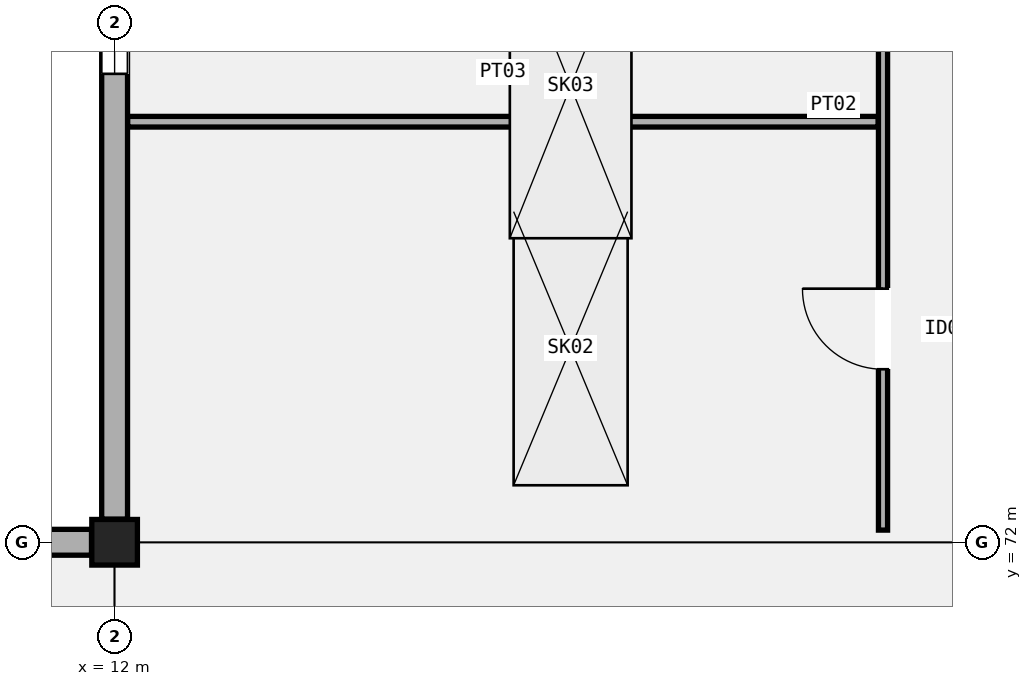
"""IFC4 building model, lengths in metres.
Left out: names, types, materials, properties, quantities, classifications, styles, units other than length and angle.
Written with IfcOpenShell. Run it as: python <this file> out.ifc"""

import sys

from ifc_helpers import new_model, si_unit, direction, frame, frame_2d, origin, origin_2d, place, context, subcontext, project, spatial, rectangle, extrude, element, fill, save


model = new_model("IFC4")
c1 = context("Model", 3, precision=1e-05, world=origin(), true_north=direction((0.0, 1.0)))
c2 = subcontext(c1, "Body", "Model", "MODEL_VIEW")
j1 = project(units=[si_unit("LENGTHUNIT", "METRE"), si_unit("PLANEANGLEUNIT", "RADIAN")], contexts=[c1])
p1 = place(None, origin())
s1 = spatial("IfcSite", under=j1, at=p1, CompositionType="ELEMENT")
p2 = place(p1, origin())
s2 = spatial("IfcBuilding", under=s1, at=p2, CompositionType="ELEMENT")
p3 = place(p2, frame((0.0, 0.0, 25.8)))
s3 = spatial("IfcBuildingStorey", under=s2, at=p3, CompositionType="ELEMENT", Elevation=25.8)
p4 = place(p3, frame((12.0, 72.0, 0.0), z_axis=(0.0, 0.0, 1.0), x_axis=(1.0, 0.0, 0.0)))
e1 = element("IfcColumn", 1, at=p4, inside=s3, PredefinedType="COLUMN", context=c2, shape_type="SweptSolid", body=[
    extrude(rectangle(XDim=0.6, YDim=0.6, at=origin_2d()), origin(), (0.0, 0.0, 1.0), 5.4),
])
p5 = place(p3, frame((0.354, 72.0, 0.0), z_axis=(0.0, 0.0, 1.0), x_axis=(1.0, 0.0, 0.0)))
e2 = element("IfcWall", 2, at=p5, inside=s3, PredefinedType="SOLIDWALL", context=c2, shape_type="SweptSolid", body=[
    extrude(rectangle(XDim=11.342, YDim=0.34, at=frame_2d((5.671, 0.0))), origin(), (0.0, 0.0, 1.0), 4.34),
])
p6 = place(p5, frame((1.5, 0.0, 0.95)))
e3 = element("IfcOpeningElement", 3, at=p6, cuts=e2, PredefinedType="OPENING", context=c2, shape_type="SweptSolid", body=[
    extrude(rectangle(XDim=3.3, YDim=1.8, at=frame_2d((1.65, 0.9))), frame((0.0, 0.18, 0.0), z_axis=(0.0, -1.0, 0.0), x_axis=(1.0, 0.0, 0.0)), (0.0, 0.0, 1.0), 0.36),
])
p7 = place(p3, frame((12.0, 72.304, 0.0), z_axis=(0.0, 0.0, 1.0), x_axis=(0.0, 1.0, 0.0)))
e4 = element("IfcWall", 4, at=p7, inside=s3, PredefinedType="SOLIDWALL", context=c2, shape_type="SweptSolid", body=[
    extrude(rectangle(XDim=11.492, YDim=0.34, at=frame_2d((5.746, 0.0))), origin(), (0.0, 0.0, 1.0), 4.44),
])
p8 = place(p7, frame((5.859, 0.0, 0.95)))
e5 = element("IfcOpeningElement", 5, at=p8, cuts=e4, PredefinedType="OPENING", context=c2, shape_type="SweptSolid", body=[
    extrude(rectangle(XDim=1.8, YDim=2.55, at=frame_2d((0.9, 1.275))), frame((0.0, 0.18, 0.0), z_axis=(0.0, -1.0, 0.0), x_axis=(1.0, 0.0, 0.0)), (0.0, 0.0, 1.0), 0.36),
])
p9 = place(p3, frame((22.11, 72.16, 0.0), z_axis=(0.0, 0.0, 1.0), x_axis=(0.0, 1.0, 0.0)))
e6 = element("IfcWall", 6, at=p9, inside=s3, PredefinedType="PARTITIONING", context=c2, shape_type="SweptSolid", body=[
    extrude(rectangle(XDim=11.68, YDim=0.12, at=frame_2d((5.84, 0.0))), origin(), (0.0, 0.0, 1.0), 4.35),
])
p10 = place(p9, frame((2.116, 0.0, 0.0)))
e7 = element("IfcOpeningElement", 7, at=p10, cuts=e6, PredefinedType="OPENING", context=c2, shape_type="SweptSolid", body=[
    extrude(rectangle(XDim=1.06, YDim=2.15, at=frame_2d((0.53, 1.075))), frame((0.0, 0.07, 0.0), z_axis=(0.0, -1.0, 0.0), x_axis=(1.0, 0.0, 0.0)), (0.0, 0.0, 1.0), 0.14),
])
p11 = place(p9, frame((8.021, 0.0, 0.0)))
e8 = element("IfcOpeningElement", 8, at=p11, cuts=e6, PredefinedType="OPENING", context=c2, shape_type="SweptSolid", body=[
    extrude(rectangle(XDim=1.09, YDim=2.16, at=frame_2d((0.545, 1.08))), frame((0.0, 0.07, 0.0), z_axis=(0.0, -1.0, 0.0), x_axis=(1.0, 0.0, 0.0)), (0.0, 0.0, 1.0), 0.14),
])
p12 = place(p3, frame((12.172, 77.533, 0.0), z_axis=(0.0, 0.0, 1.0), x_axis=(1.0, 0.0, 0.0)))
e9 = element("IfcWall", 9, at=p12, inside=s3, PredefinedType="PARTITIONING", context=c2, shape_type="SweptSolid", body=[
    extrude(rectangle(XDim=9.873, YDim=0.14, at=frame_2d((4.937, 0.0))), origin(), (0.0, 0.0, 1.0), 4.35),
])
p13 = place(p8, origin())
e10 = element("IfcWindow", 10, at=p13, inside=s3, PartitioningType="SINGLE_PANEL", PredefinedType="WINDOW", context=c2, shape_type="SweptSolid", body=[
    extrude(rectangle(XDim=1.8, YDim=2.55, at=frame_2d((0.9, 1.275))), frame((0.0, 0.03, 0.0), z_axis=(0.0, -1.0, 0.0), x_axis=(1.0, 0.0, 0.0)), (0.0, 0.0, 1.0), 0.06),
])
fill(e5, e10)
p14 = place(p2, frame((0.0, 0.0, 31.2)))
p15 = place(p14, frame((0.0, 0.0, -0.36)))
p16 = place(p15, frame((18.0, 74.55, 0.0)))
p17 = place(p16, frame((0.0, 0.0, 0.31)))
e11 = element("IfcWindow", 11, at=p17, inside=s3, PartitioningType="SINGLE_PANEL", PredefinedType="SKYLIGHT", context=c2, shape_type="SweptSolid", body=[
    extrude(rectangle(XDim=3.6, YDim=1.5, at=origin_2d()), origin(), (0.0, 0.0, 1.0), 0.05),
])
p18 = place(p15, frame((18.0, 78.0, 0.0)))
p19 = place(p18, frame((0.0, 0.0, 0.31)))
e12 = element("IfcWindow", 12, at=p19, inside=s3, PartitioningType="SINGLE_PANEL", PredefinedType="SKYLIGHT", context=c2, shape_type="SweptSolid", body=[
    extrude(rectangle(XDim=4.0, YDim=1.6, at=origin_2d()), origin(), (0.0, 0.0, 1.0), 0.05),
])
p20 = place(p10, origin())
e13 = element("IfcDoor", 13, at=p20, inside=s3, OperationType="SINGLE_SWING_RIGHT", PredefinedType="DOOR", context=c2, shape_type="SweptSolid", body=[
    extrude(rectangle(XDim=1.06, YDim=2.15, at=frame_2d((0.53, 1.075))), frame((0.0, 0.025, 0.0), z_axis=(0.0, -1.0, 0.0), x_axis=(1.0, 0.0, 0.0)), (0.0, 0.0, 1.0), 0.05),
])
fill(e7, e13)
save(model, sys.argv[1])
